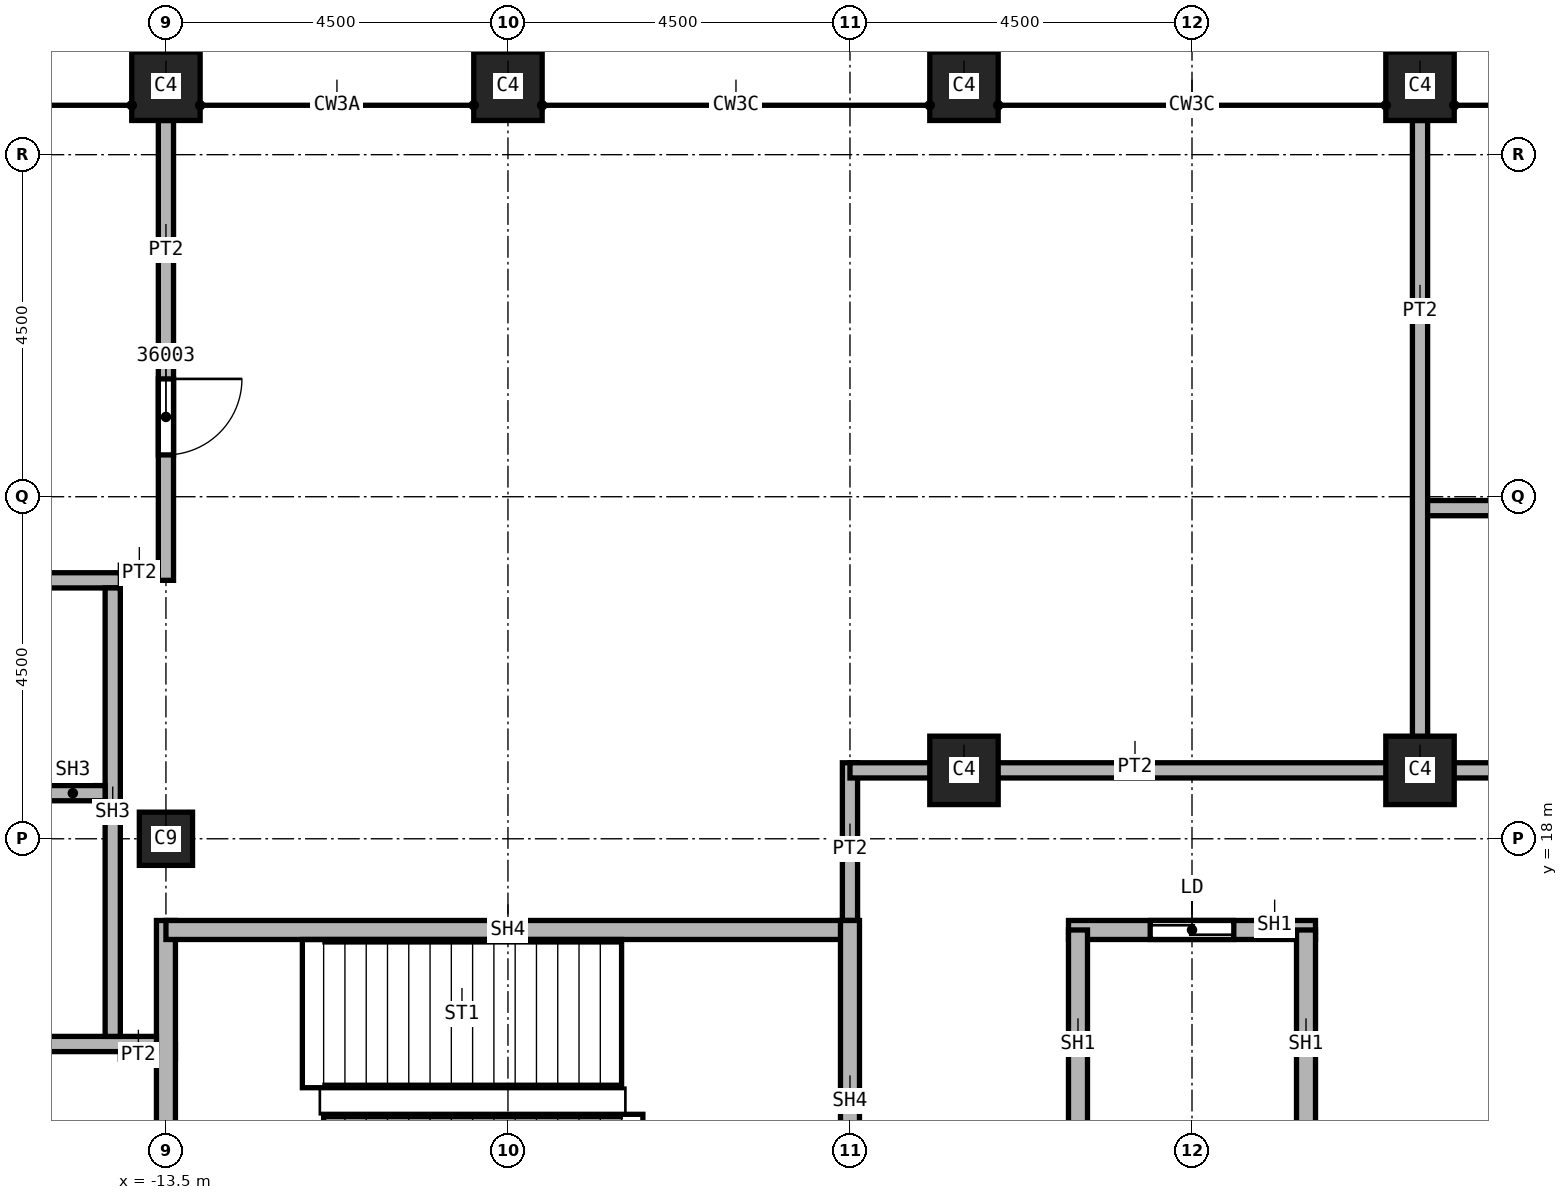
"""IFC4 building model, lengths in metres.
Left out: names, types, materials, properties, quantities, classifications, styles, units other than length and angle.
Written with IfcOpenShell. Run it as: python <this file> out.ifc"""

import sys

from ifc_helpers import new_model, si_unit, direction, frame, frame_2d, origin, origin_2d, place, context, subcontext, project, spatial, rectangle, extrude, element, fill, save


model = new_model("IFC4")
c1 = context("Model", 3, precision=1e-05, world=origin(), true_north=direction((0.0, 1.0)))
c2 = subcontext(c1, "Body", "Model", "MODEL_VIEW")
j1 = project(units=[si_unit("LENGTHUNIT", "METRE"), si_unit("PLANEANGLEUNIT", "RADIAN")], contexts=[c1])
p1 = place(None, origin())
s1 = spatial("IfcSite", under=j1, at=p1, CompositionType="ELEMENT")
p2 = place(p1, origin())
s2 = spatial("IfcBuilding", under=s1, at=p2, CompositionType="ELEMENT")
p3 = place(p2, frame((0.0, 0.0, 381.0)))
s3 = spatial("IfcBuildingStorey", under=s2, at=p3, CompositionType="ELEMENT", Elevation=381.0)
p4 = place(p3, frame((-13.5, 18.0, 0.0), z_axis=(0.0, 0.0, 1.0), x_axis=(1.0, 0.0, 0.0)))
e1 = element("IfcColumn", 1, at=p4, inside=s3, PredefinedType="COLUMN", context=c2, shape_type="SweptSolid", body=[
    extrude(rectangle(XDim=0.7, YDim=0.7, at=origin_2d()), origin(), (0.0, 0.0, 1.0), 4.6),
])
for number, where, z_axis, x_axis in (
    (2, (3.0, 27.9, 0.0), (0.0, 0.0, 1.0), (1.0, 0.0, 0.0)),
    (3, (-3.0, 27.9, 0.0), (0.0, 0.0, 1.0), (1.0, 0.0, 0.0)),
    (4, (-9.0, 27.9, 0.0), (0.0, 0.0, 1.0), (1.0, 0.0, 0.0)),
    (5, (-13.5, 27.9, 0.0), (0.0, 0.0, 1.0), (1.0, 0.0, 0.0)),
    (6, (3.0, 18.9, 0.0), (0.0, 0.0, 1.0), (1.0, 0.0, 0.0)),
    (7, (-3.0, 18.9, 0.0), (0.0, 0.0, 1.0), (1.0, 0.0, 0.0)),
):
    element("IfcColumn", number, at=place(p3, frame(where, z_axis=z_axis, x_axis=x_axis)), inside=s3, PredefinedType="COLUMN", context=c2, shape_type="SweptSolid", body=[
        extrude(rectangle(XDim=0.9, YDim=0.9, at=origin_2d()), origin(), (0.0, 0.0, 1.0), 4.6),
    ])
p5 = place(p3, frame((-14.1, 15.2, 0.0), z_axis=(0.0, 0.0, 1.0), x_axis=(1.0, 0.0, 0.0)))
e8 = element("IfcWall", 8, at=p5, inside=s3, PredefinedType="PARTITIONING", context=c2, shape_type="SweptSolid", body=[
    extrude(rectangle(XDim=0.725, YDim=0.2, at=frame_2d((0.363, 0.0))), origin(), (0.0, 0.0, 1.0), 4.15),
])
p6 = place(p3, frame((-13.5, 21.5, 0.0), z_axis=(0.0, 0.0, 1.0), x_axis=(-1.0, 0.0, 0.0)))
e9 = element("IfcWall", 9, at=p6, inside=s3, PredefinedType="PARTITIONING", context=c2, shape_type="SweptSolid", body=[
    extrude(rectangle(XDim=0.6, YDim=0.2, at=frame_2d((0.3, 0.0))), origin(), (0.0, 0.0, 1.0), 4.15),
])
p7 = place(p3, frame((-13.5, 27.45, 0.0), z_axis=(0.0, 0.0, 1.0), x_axis=(0.0, -1.0, 0.0)))
e10 = element("IfcWall", 10, at=p7, inside=s3, PredefinedType="PARTITIONING", context=c2, shape_type="SweptSolid", body=[
    extrude(rectangle(XDim=6.05, YDim=0.2, at=frame_2d((3.025, 0.0))), origin(), (0.0, 0.0, 1.0), 4.15),
])
p8 = place(p7, frame((3.4, 0.0, 0.0)))
e11 = element("IfcOpeningElement", 11, at=p8, cuts=e10, PredefinedType="OPENING", context=c2, shape_type="SweptSolid", body=[
    extrude(rectangle(XDim=1.0, YDim=2.1, at=frame_2d((0.5, 1.05))), frame((0.0, 0.1, 0.0), z_axis=(0.0, -1.0, 0.0), x_axis=(1.0, 0.0, 0.0)), (0.0, 0.0, 1.0), 0.2),
])
p9 = place(p3, frame((-4.5, 16.8, 0.0), z_axis=(0.0, 0.0, 1.0), x_axis=(0.0, 1.0, 0.0)))
e12 = element("IfcWall", 12, at=p9, inside=s3, PredefinedType="PARTITIONING", context=c2, shape_type="SweptSolid", body=[
    extrude(rectangle(XDim=2.2, YDim=0.2, at=frame_2d((1.1, 0.0))), origin(), (0.0, 0.0, 1.0), 4.15),
])
p10 = place(p3, frame((-4.5, 18.9, 0.0), z_axis=(0.0, 0.0, 1.0), x_axis=(1.0, 0.0, 0.0)))
e13 = element("IfcWall", 13, at=p10, inside=s3, PredefinedType="PARTITIONING", context=c2, shape_type="SweptSolid", body=[
    extrude(rectangle(XDim=9.1, YDim=0.2, at=frame_2d((4.55, 0.0))), origin(), (0.0, 0.0, 1.0), 4.15),
])
p11 = place(p3, frame((3.0, 22.35, 0.0), z_axis=(0.0, 0.0, 1.0), x_axis=(1.0, 0.0, 0.0)))
e14 = element("IfcWall", 14, at=p11, inside=s3, PredefinedType="PARTITIONING", context=c2, shape_type="SweptSolid", body=[
    extrude(rectangle(XDim=10.5, YDim=0.2, at=frame_2d((5.25, 0.0))), origin(), (0.0, 0.0, 1.0), 4.15),
])
p12 = place(p3, frame((3.0, 27.45, 0.0), z_axis=(0.0, 0.0, 1.0), x_axis=(0.0, -1.0, 0.0)))
e15 = element("IfcWall", 15, at=p12, inside=s3, PredefinedType="PARTITIONING", context=c2, shape_type="SweptSolid", body=[
    extrude(rectangle(XDim=8.55, YDim=0.2, at=frame_2d((4.275, 0.0))), origin(), (0.0, 0.0, 1.0), 4.15),
])
p13 = place(p3, frame((-1.625, 16.8, 0.0), z_axis=(0.0, 0.0, 1.0), x_axis=(1.0, 0.0, 0.0)))
e16 = element("IfcWall", 16, at=p13, inside=s3, PredefinedType="SOLIDWALL", context=c2, shape_type="SweptSolid", body=[
    extrude(rectangle(XDim=3.25, YDim=0.25, at=frame_2d((1.625, 0.0))), origin(), (0.0, 0.0, 1.0), 4.15),
])
p14 = place(p13, frame((1.075, 0.0, 0.0)))
e17 = element("IfcOpeningElement", 17, at=p14, cuts=e16, PredefinedType="OPENING", context=c2, shape_type="SweptSolid", body=[
    extrude(rectangle(XDim=1.1, YDim=2.1, at=frame_2d((0.55, 1.05))), frame((0.0, 0.125, 0.0), z_axis=(0.0, -1.0, 0.0), x_axis=(1.0, 0.0, 0.0)), (0.0, 0.0, 1.0), 0.25),
])
p15 = place(p3, frame((-1.5, 13.8, 0.0), z_axis=(0.0, 0.0, 1.0), x_axis=(0.0, 1.0, 0.0)))
e18 = element("IfcWall", 18, at=p15, inside=s3, PredefinedType="SOLIDWALL", context=c2, shape_type="SweptSolid", body=[
    extrude(rectangle(XDim=3.0, YDim=0.25, at=frame_2d((1.5, 0.0))), origin(), (0.0, 0.0, 1.0), 4.15),
])
p16 = place(p3, frame((1.5, 16.8, 0.0), z_axis=(0.0, 0.0, 1.0), x_axis=(0.0, -1.0, 0.0)))
e19 = element("IfcWall", 19, at=p16, inside=s3, PredefinedType="SOLIDWALL", context=c2, shape_type="SweptSolid", body=[
    extrude(rectangle(XDim=3.125, YDim=0.25, at=frame_2d((1.562, 0.0))), origin(), (0.0, 0.0, 1.0), 4.15),
])
p17 = place(p3, frame((-13.5, 12.175, 0.0), z_axis=(0.0, 0.0, 1.0), x_axis=(0.0, 1.0, 0.0)))
e20 = element("IfcWall", 20, at=p17, inside=s3, PredefinedType="SOLIDWALL", context=c2, shape_type="SweptSolid", body=[
    extrude(rectangle(XDim=4.75, YDim=0.25, at=frame_2d((2.375, 0.0))), origin(), (0.0, 0.0, 1.0), 4.15),
])
p18 = place(p3, frame((-13.5, 16.8, 0.0), z_axis=(0.0, 0.0, 1.0), x_axis=(1.0, 0.0, 0.0)))
e21 = element("IfcWall", 21, at=p18, inside=s3, PredefinedType="SOLIDWALL", context=c2, shape_type="SweptSolid", body=[
    extrude(rectangle(XDim=9.1, YDim=0.25, at=frame_2d((4.55, 0.0))), origin(), (0.0, 0.0, 1.0), 4.15),
])
p19 = place(p3, frame((-4.5, 16.925, 0.0), z_axis=(0.0, 0.0, 1.0), x_axis=(0.0, -1.0, 0.0)))
e22 = element("IfcWall", 22, at=p19, inside=s3, PredefinedType="SOLIDWALL", context=c2, shape_type="SweptSolid", body=[
    extrude(rectangle(XDim=4.625, YDim=0.25, at=frame_2d((2.312, 0.0))), origin(), (0.0, 0.0, 1.0), 4.15),
])
p20 = place(p3, frame((-21.9, 15.3, 0.0), z_axis=(0.0, 0.0, 1.0), x_axis=(1.0, 0.0, 0.0)))
e23 = element("IfcWall", 23, at=p20, inside=s3, PredefinedType="SOLIDWALL", context=c2, shape_type="SweptSolid", body=[
    extrude(rectangle(XDim=8.275, YDim=0.2, at=frame_2d((4.137, 0.0))), origin(), (0.0, 0.0, 1.0), 4.15),
])
p21 = place(p20, frame((4.8, 0.0, 0.0)))
e24 = element("IfcOpeningElement", 24, at=p21, cuts=e23, PredefinedType="OPENING", context=c2, shape_type="SweptSolid", body=[
    extrude(rectangle(XDim=1.2, YDim=2.1, at=frame_2d((0.6, 1.05))), frame((0.0, 0.1, 0.0), z_axis=(0.0, -1.0, 0.0), x_axis=(1.0, 0.0, 0.0)), (0.0, 0.0, 1.0), 0.2),
])
p22 = place(p3, frame((-21.9, 21.4, 0.0), z_axis=(0.0, 0.0, 1.0), x_axis=(1.0, 0.0, 0.0)))
e25 = element("IfcWall", 25, at=p22, inside=s3, PredefinedType="SOLIDWALL", context=c2, shape_type="SweptSolid", body=[
    extrude(rectangle(XDim=7.8, YDim=0.2, at=frame_2d((3.9, 0.0))), origin(), (0.0, 0.0, 1.0), 4.15),
])
p23 = place(p22, frame((3.2, 0.0, 0.0)))
e26 = element("IfcOpeningElement", 26, at=p23, cuts=e25, PredefinedType="OPENING", context=c2, shape_type="SweptSolid", body=[
    extrude(rectangle(XDim=1.2, YDim=2.1, at=frame_2d((0.6, 1.05))), frame((0.0, 0.1, 0.0), z_axis=(0.0, -1.0, 0.0), x_axis=(1.0, 0.0, 0.0)), (0.0, 0.0, 1.0), 0.2),
])
p24 = place(p3, frame((-14.2, 15.4, 0.0), z_axis=(0.0, 0.0, 1.0), x_axis=(0.0, 1.0, 0.0)))
e27 = element("IfcWall", 27, at=p24, inside=s3, PredefinedType="SOLIDWALL", context=c2, shape_type="SweptSolid", body=[
    extrude(rectangle(XDim=5.9, YDim=0.2, at=frame_2d((2.95, 0.0))), origin(), (0.0, 0.0, 1.0), 4.15),
])
p25 = place(p3, frame((-17.1, 18.6, 0.0), z_axis=(0.0, 0.0, 1.0), x_axis=(1.0, 0.0, 0.0)))
e28 = element("IfcWall", 28, at=p25, inside=s3, PredefinedType="SOLIDWALL", context=c2, shape_type="SweptSolid", body=[
    extrude(rectangle(XDim=2.8, YDim=0.2, at=frame_2d((1.4, 0.0))), origin(), (0.0, 0.0, 1.0), 4.15),
])
p26 = place(p25, frame((0.85, 0.0, 0.0)))
e29 = element("IfcOpeningElement", 29, at=p26, cuts=e28, PredefinedType="OPENING", context=c2, shape_type="SweptSolid", body=[
    extrude(rectangle(XDim=1.1, YDim=2.1, at=frame_2d((0.55, 1.05))), frame((0.0, 0.1, 0.0), z_axis=(0.0, -1.0, 0.0), x_axis=(1.0, 0.0, 0.0)), (0.0, 0.0, 1.0), 0.2),
])
p27 = place(p8, origin())
e30 = element("IfcDoor", 30, at=p27, inside=s3, OperationType="SINGLE_SWING_RIGHT", PredefinedType="DOOR", context=c2, shape_type="SweptSolid", body=[
    extrude(rectangle(XDim=1.0, YDim=2.1, at=frame_2d((0.5, 1.05))), frame((0.0, 0.025, 0.0), z_axis=(0.0, -1.0, 0.0), x_axis=(1.0, 0.0, 0.0)), (0.0, 0.0, 1.0), 0.05),
])
fill(e11, e30)
p28 = place(p14, origin())
e31 = element("IfcDoor", 31, at=p28, inside=s3, OperationType="SLIDING_TO_LEFT", PredefinedType="DOOR", context=c2, shape_type="SweptSolid", body=[
    extrude(rectangle(XDim=1.1, YDim=2.1, at=frame_2d((0.55, 1.05))), frame((0.0, 0.025, 0.0), z_axis=(0.0, -1.0, 0.0), x_axis=(1.0, 0.0, 0.0)), (0.0, 0.0, 1.0), 0.05),
])
fill(e17, e31)
save(model, sys.argv[1])
